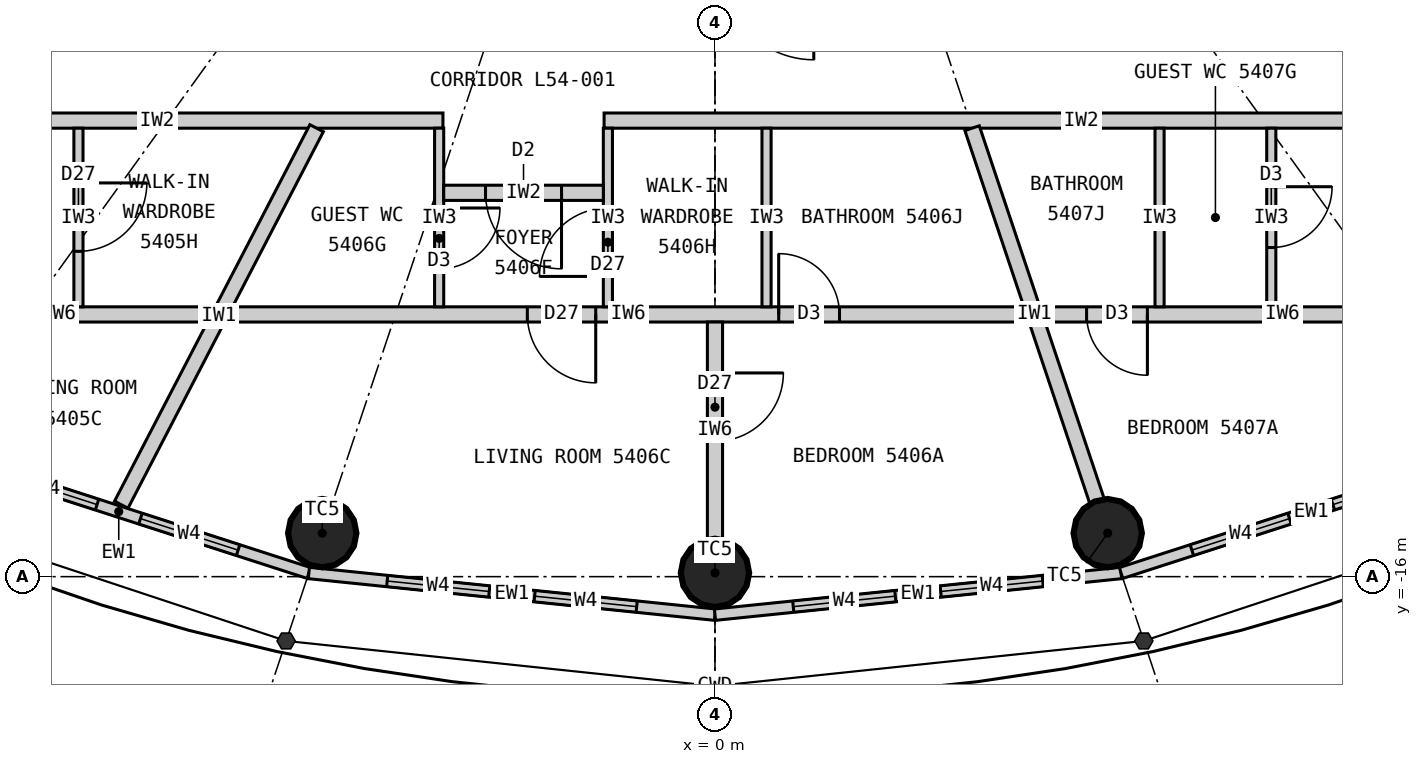
"""IFC4 building model, lengths in metres.
Left out: names, types, materials, properties, quantities, classifications, styles, units other than length and angle.
Written with IfcOpenShell. Run it as: python <this file> out.ifc"""

import sys

from ifc_helpers import new_model, si_unit, direction, frame, frame_2d, origin, origin_2d, place, context, subcontext, project, spatial, rectangle, circle, extrude, element, fill, save


model = new_model("IFC4")
c1 = context("Model", 3, precision=1e-05, world=origin(), true_north=direction((0.0, 1.0)))
c2 = subcontext(c1, "Body", "Model", "MODEL_VIEW")
j1 = project(units=[si_unit("LENGTHUNIT", "METRE"), si_unit("PLANEANGLEUNIT", "RADIAN")], contexts=[c1])
p1 = place(None, origin())
s1 = spatial("IfcSite", under=j1, at=p1, CompositionType="ELEMENT")
p2 = place(p1, origin())
s2 = spatial("IfcBuilding", under=s1, at=p2, CompositionType="ELEMENT")
p3 = place(p2, frame((0.0, 0.0, 202.8)))
s3 = spatial("IfcBuildingStorey", under=s2, at=p3, CompositionType="ELEMENT", Elevation=202.8)
for number, where, z_axis, x_axis in (
    (1, (-5.167, -15.427, 0.0), (0.0, 0.0, 1.0), (1.0, 0.0, 0.0)),
    (2, (0.0, -15.95, 0.0), (0.0, 0.0, 1.0), (1.0, 0.0, 0.0)),
    (3, (5.167, -15.427, 0.0), (0.0, 0.0, 1.0), (1.0, 0.0, 0.0)),
):
    element("IfcColumn", number, at=place(p3, frame(where, z_axis=z_axis, x_axis=x_axis)), inside=s3, PredefinedType="COLUMN", context=c2, shape_type="SweptSolid", body=[
        extrude(circle(Radius=0.45, at=origin_2d()), origin(), (0.0, 0.0, 1.0), 3.3),
    ])
p4 = place(p3, frame((-10.346, -14.336, 0.0), z_axis=(0.0, 0.0, 1.0), x_axis=(0.951644702515, -0.307200846638, 0.0)))
e4 = element("IfcWall", 4, at=p4, inside=s3, PredefinedType="ELEMENTEDWALL", context=c2, shape_type="SweptSolid", body=[
    extrude(rectangle(XDim=5.258, YDim=0.15, at=frame_2d((2.629, 0.0))), origin(), (0.0, 0.0, 1.0), 3.12),
])
p5 = place(p4, frame((0.979, 0.0, 0.9)))
e5 = element("IfcOpeningElement", 5, at=p5, cuts=e4, PredefinedType="OPENING", context=c2, shape_type="SweptSolid", body=[
    extrude(rectangle(XDim=1.35, YDim=1.9, at=frame_2d((0.675, 0.95))), frame((0.0, 0.085, 0.0), z_axis=(0.0, -1.0, 0.0), x_axis=(1.0, 0.0, 0.0)), (0.0, 0.0, 1.0), 0.17),
])
p6 = place(p4, frame((2.929, 0.0, 0.9)))
e6 = element("IfcOpeningElement", 6, at=p6, cuts=e4, PredefinedType="OPENING", context=c2, shape_type="SweptSolid", body=[
    extrude(rectangle(XDim=1.35, YDim=1.9, at=frame_2d((0.675, 0.95))), frame((0.0, 0.085, 0.0), z_axis=(0.0, -1.0, 0.0), x_axis=(1.0, 0.0, 0.0)), (0.0, 0.0, 1.0), 0.17),
])
p7 = place(p3, frame((-5.343, -15.952, 0.0), z_axis=(0.0, 0.0, 1.0), x_axis=(0.994774574972, -0.102095763818, 0.0)))
e7 = element("IfcWall", 7, at=p7, inside=s3, PredefinedType="ELEMENTEDWALL", context=c2, shape_type="SweptSolid", body=[
    extrude(rectangle(XDim=5.371, YDim=0.15, at=frame_2d((2.686, 0.0))), origin(), (0.0, 0.0, 1.0), 3.12),
])
p8 = place(p7, frame((1.035, 0.0, 0.9)))
e8 = element("IfcOpeningElement", 8, at=p8, cuts=e7, PredefinedType="OPENING", context=c2, shape_type="SweptSolid", body=[
    extrude(rectangle(XDim=1.35, YDim=1.9, at=frame_2d((0.675, 0.95))), frame((0.0, 0.085, 0.0), z_axis=(0.0, -1.0, 0.0), x_axis=(1.0, 0.0, 0.0)), (0.0, 0.0, 1.0), 0.17),
])
p9 = place(p7, frame((2.985, 0.0, 0.9)))
e9 = element("IfcOpeningElement", 9, at=p9, cuts=e7, PredefinedType="OPENING", context=c2, shape_type="SweptSolid", body=[
    extrude(rectangle(XDim=1.35, YDim=1.9, at=frame_2d((0.675, 0.95))), frame((0.0, 0.085, 0.0), z_axis=(0.0, -1.0, 0.0), x_axis=(1.0, 0.0, 0.0)), (0.0, 0.0, 1.0), 0.17),
])
p10 = place(p3, frame((0.0, -16.5, 0.0), z_axis=(0.0, 0.0, 1.0), x_axis=(0.994774574972, 0.102095763818, 0.0)))
e10 = element("IfcWall", 10, at=p10, inside=s3, PredefinedType="ELEMENTEDWALL", context=c2, shape_type="SweptSolid", body=[
    extrude(rectangle(XDim=5.371, YDim=0.15, at=frame_2d((2.686, 0.0))), origin(), (0.0, 0.0, 1.0), 3.12),
])
p11 = place(p10, frame((1.035, 0.0, 0.9)))
e11 = element("IfcOpeningElement", 11, at=p11, cuts=e10, PredefinedType="OPENING", context=c2, shape_type="SweptSolid", body=[
    extrude(rectangle(XDim=1.35, YDim=1.9, at=frame_2d((0.675, 0.95))), frame((0.0, 0.085, 0.0), z_axis=(0.0, -1.0, 0.0), x_axis=(1.0, 0.0, 0.0)), (0.0, 0.0, 1.0), 0.17),
])
p12 = place(p10, frame((2.985, 0.0, 0.9)))
e12 = element("IfcOpeningElement", 12, at=p12, cuts=e10, PredefinedType="OPENING", context=c2, shape_type="SweptSolid", body=[
    extrude(rectangle(XDim=1.35, YDim=1.9, at=frame_2d((0.675, 0.95))), frame((0.0, 0.085, 0.0), z_axis=(0.0, -1.0, 0.0), x_axis=(1.0, 0.0, 0.0)), (0.0, 0.0, 1.0), 0.17),
])
p13 = place(p3, frame((5.343, -15.952, 0.0), z_axis=(0.0, 0.0, 1.0), x_axis=(0.951644702515, 0.307200846638, 0.0)))
e13 = element("IfcWall", 13, at=p13, inside=s3, PredefinedType="ELEMENTEDWALL", context=c2, shape_type="SweptSolid", body=[
    extrude(rectangle(XDim=5.258, YDim=0.15, at=frame_2d((2.629, 0.0))), origin(), (0.0, 0.0, 1.0), 3.12),
])
p14 = place(p13, frame((0.979, 0.0, 0.9)))
e14 = element("IfcOpeningElement", 14, at=p14, cuts=e13, PredefinedType="OPENING", context=c2, shape_type="SweptSolid", body=[
    extrude(rectangle(XDim=1.35, YDim=1.9, at=frame_2d((0.675, 0.95))), frame((0.0, 0.085, 0.0), z_axis=(0.0, -1.0, 0.0), x_axis=(1.0, 0.0, 0.0)), (0.0, 0.0, 1.0), 0.17),
])
p15 = place(p13, frame((2.929, 0.0, 0.9)))
e15 = element("IfcOpeningElement", 15, at=p15, cuts=e13, PredefinedType="OPENING", context=c2, shape_type="SweptSolid", body=[
    extrude(rectangle(XDim=1.35, YDim=1.9, at=frame_2d((0.675, 0.95))), frame((0.0, 0.085, 0.0), z_axis=(0.0, -1.0, 0.0), x_axis=(1.0, 0.0, 0.0)), (0.0, 0.0, 1.0), 0.17),
])
p16 = place(p3, frame((11.1, -10.0, 0.0), z_axis=(0.0, 0.0, 1.0), x_axis=(-1.0, 0.0, 0.0)))
e16 = element("IfcWall", 16, at=p16, inside=s3, PredefinedType="PARTITIONING", context=c2, shape_type="SweptSolid", body=[
    extrude(rectangle(XDim=12.559, YDim=0.2, at=frame_2d((6.28, 0.0))), origin(), (0.0, 0.0, 1.0), 3.12),
])
p17 = place(p3, frame((-3.579, -10.0, 0.0), z_axis=(0.0, 0.0, 1.0), x_axis=(-1.0, 0.0, 0.0)))
e17 = element("IfcWall", 17, at=p17, inside=s3, PredefinedType="PARTITIONING", context=c2, shape_type="SweptSolid", body=[
    extrude(rectangle(XDim=7.521, YDim=0.2, at=frame_2d((3.761, 0.0))), origin(), (0.0, 0.0, 1.0), 3.12),
])
p18 = place(p17, frame((6.206, 0.0, 0.0)))
e18 = element("IfcOpeningElement", 18, at=p18, cuts=e17, PredefinedType="OPENING", context=c2, shape_type="SweptSolid", body=[
    extrude(rectangle(XDim=1.0, YDim=2.2, at=frame_2d((0.5, 1.1))), frame((0.0, 0.11, 0.0), z_axis=(0.0, -1.0, 0.0), x_axis=(1.0, 0.0, 0.0)), (0.0, 0.0, 1.0), 0.22),
])
p19 = place(p3, frame((-5.241, -10.1, 0.0), z_axis=(0.0, 0.0, 1.0), x_axis=(-0.460603196597, -0.887606160008, 0.0)))
e19 = element("IfcWall", 19, at=p19, inside=s3, PredefinedType="PARTITIONING", context=c2, shape_type="SweptSolid", body=[
    extrude(rectangle(XDim=5.58, YDim=0.2, at=frame_2d((2.79, 0.0))), origin(), (0.0, 0.0, 1.0), 3.12),
])
p20 = place(p3, frame((3.383, -10.1, 0.0), z_axis=(0.0, 0.0, 1.0), x_axis=(0.317602151035, -0.948224063003, 0.0)))
e20 = element("IfcWall", 20, at=p20, inside=s3, PredefinedType="PARTITIONING", context=c2, shape_type="SweptSolid", body=[
    extrude(rectangle(XDim=5.168, YDim=0.2, at=frame_2d((2.584, 0.0))), origin(), (0.0, 0.0, 1.0), 2.42),
])
p21 = place(p3, frame((-10.609, -12.55, 0.0), z_axis=(0.0, 0.0, 1.0), x_axis=(1.0, 0.0, 0.0)))
e21 = element("IfcWall", 21, at=p21, inside=s3, PredefinedType="PARTITIONING", context=c2, shape_type="SweptSolid", body=[
    extrude(rectangle(XDim=3.947, YDim=0.2, at=frame_2d((1.974, 0.0))), origin(), (0.0, 0.0, 1.0), 3.12),
])
p22 = place(p3, frame((-8.375, -10.1, 0.0), z_axis=(0.0, 0.0, 1.0), x_axis=(0.0, -1.0, 0.0)))
e22 = element("IfcWall", 22, at=p22, inside=s3, PredefinedType="PARTITIONING", context=c2, shape_type="SweptSolid", body=[
    extrude(rectangle(XDim=2.35, YDim=0.12, at=frame_2d((1.175, 0.0))), origin(), (0.0, 0.0, 1.0), 3.12),
])
p23 = place(p22, frame((0.72, 0.0, 0.0)))
e23 = element("IfcOpeningElement", 23, at=p23, cuts=e22, PredefinedType="OPENING", context=c2, shape_type="SweptSolid", body=[
    extrude(rectangle(XDim=0.9, YDim=2.1, at=frame_2d((0.45, 1.05))), frame((0.0, 0.07, 0.0), z_axis=(0.0, -1.0, 0.0), x_axis=(1.0, 0.0, 0.0)), (0.0, 0.0, 1.0), 0.14),
])
p24 = place(p3, frame((-6.364, -12.55, 0.0), z_axis=(0.0, 0.0, 1.0), x_axis=(1.0, 0.0, 0.0)))
e24 = element("IfcWall", 24, at=p24, inside=s3, PredefinedType="PARTITIONING", context=c2, shape_type="SweptSolid", body=[
    extrude(rectangle(XDim=10.446, YDim=0.2, at=frame_2d((5.223, 0.0))), origin(), (0.0, 0.0, 1.0), 3.12),
])
p25 = place(p24, frame((7.202, 0.0, 0.0)))
e25 = element("IfcOpeningElement", 25, at=p25, cuts=e24, PredefinedType="OPENING", context=c2, shape_type="SweptSolid", body=[
    extrude(rectangle(XDim=0.8, YDim=2.1, at=frame_2d((0.4, 1.05))), frame((0.0, 0.11, 0.0), z_axis=(0.0, -1.0, 0.0), x_axis=(1.0, 0.0, 0.0)), (0.0, 0.0, 1.0), 0.22),
])
p26 = place(p24, frame((3.895, 0.0, 0.0)))
e26 = element("IfcOpeningElement", 26, at=p26, cuts=e24, PredefinedType="OPENING", context=c2, shape_type="SweptSolid", body=[
    extrude(rectangle(XDim=0.9, YDim=2.1, at=frame_2d((0.45, 1.05))), frame((0.0, 0.11, 0.0), z_axis=(0.0, -1.0, 0.0), x_axis=(1.0, 0.0, 0.0)), (0.0, 0.0, 1.0), 0.22),
])
p27 = place(p3, frame((0.0, -12.65, 0.0), z_axis=(0.0, 0.0, 1.0), x_axis=(0.0, -1.0, 0.0)))
e27 = element("IfcWall", 27, at=p27, inside=s3, PredefinedType="PARTITIONING", context=c2, shape_type="SweptSolid", body=[
    extrude(rectangle(XDim=2.85, YDim=0.2, at=frame_2d((1.425, 0.0))), origin(), (0.0, 0.0, 1.0), 2.42),
])
p28 = place(p27, frame((0.67, 0.0, 0.0)))
e28 = element("IfcOpeningElement", 28, at=p28, cuts=e27, PredefinedType="OPENING", context=c2, shape_type="SweptSolid", body=[
    extrude(rectangle(XDim=0.9, YDim=2.1, at=frame_2d((0.45, 1.05))), frame((0.0, 0.11, 0.0), z_axis=(0.0, -1.0, 0.0), x_axis=(1.0, 0.0, 0.0)), (0.0, 0.0, 1.0), 0.22),
])
p29 = place(p3, frame((-3.629, -10.1, 0.0), z_axis=(0.0, 0.0, 1.0), x_axis=(0.0, -1.0, 0.0)))
e29 = element("IfcWall", 29, at=p29, inside=s3, PredefinedType="PARTITIONING", context=c2, shape_type="SweptSolid", body=[
    extrude(rectangle(XDim=2.35, YDim=0.12, at=frame_2d((1.175, 0.0))), origin(), (0.0, 0.0, 1.0), 3.12),
])
p30 = place(p29, frame((1.05, 0.0, 0.0)))
e30 = element("IfcOpeningElement", 30, at=p30, cuts=e29, PredefinedType="OPENING", context=c2, shape_type="SweptSolid", body=[
    extrude(rectangle(XDim=0.8, YDim=2.1, at=frame_2d((0.4, 1.05))), frame((0.0, 0.07, 0.0), z_axis=(0.0, -1.0, 0.0), x_axis=(1.0, 0.0, 0.0)), (0.0, 0.0, 1.0), 0.14),
])
p31 = place(p3, frame((-1.409, -10.1, 0.0), z_axis=(0.0, 0.0, 1.0), x_axis=(0.0, -1.0, 0.0)))
e31 = element("IfcWall", 31, at=p31, inside=s3, PredefinedType="PARTITIONING", context=c2, shape_type="SweptSolid", body=[
    extrude(rectangle(XDim=2.35, YDim=0.12, at=frame_2d((1.175, 0.0))), origin(), (0.0, 0.0, 1.0), 3.12),
])
p32 = place(p31, frame((1.05, 0.0, 0.0)))
e32 = element("IfcOpeningElement", 32, at=p32, cuts=e31, PredefinedType="OPENING", context=c2, shape_type="SweptSolid", body=[
    extrude(rectangle(XDim=0.9, YDim=2.1, at=frame_2d((0.45, 1.05))), frame((0.0, 0.07, 0.0), z_axis=(0.0, -1.0, 0.0), x_axis=(1.0, 0.0, 0.0)), (0.0, 0.0, 1.0), 0.14),
])
p33 = place(p3, frame((0.678, -10.1, 0.0), z_axis=(0.0, 0.0, 1.0), x_axis=(0.0, -1.0, 0.0)))
e33 = element("IfcWall", 33, at=p33, inside=s3, PredefinedType="PARTITIONING", context=c2, shape_type="SweptSolid", body=[
    extrude(rectangle(XDim=2.35, YDim=0.12, at=frame_2d((1.175, 0.0))), origin(), (0.0, 0.0, 1.0), 3.12),
])
p34 = place(p3, frame((-3.569, -10.95, 0.0), z_axis=(0.0, 0.0, 1.0), x_axis=(1.0, 0.0, 0.0)))
e34 = element("IfcWall", 34, at=p34, inside=s3, PredefinedType="PARTITIONING", context=c2, shape_type="SweptSolid", body=[
    extrude(rectangle(XDim=2.1, YDim=0.2, at=frame_2d((1.05, 0.0))), origin(), (0.0, 0.0, 1.0), 3.12),
])
p35 = place(p34, frame((0.55, 0.0, 0.0)))
e35 = element("IfcOpeningElement", 35, at=p35, cuts=e34, PredefinedType="OPENING", context=c2, shape_type="SweptSolid", body=[
    extrude(rectangle(XDim=1.0, YDim=2.2, at=frame_2d((0.5, 1.1))), frame((0.0, 0.11, 0.0), z_axis=(0.0, -1.0, 0.0), x_axis=(1.0, 0.0, 0.0)), (0.0, 0.0, 1.0), 0.22),
])
p36 = place(p3, frame((4.325, -12.55, 0.0), z_axis=(0.0, 0.0, 1.0), x_axis=(1.0, 0.0, 0.0)))
e36 = element("IfcWall", 36, at=p36, inside=s3, PredefinedType="PARTITIONING", context=c2, shape_type="SweptSolid", body=[
    extrude(rectangle(XDim=6.284, YDim=0.2, at=frame_2d((3.142, 0.0))), origin(), (0.0, 0.0, 1.0), 3.12),
])
p37 = place(p36, frame((0.564, 0.0, 0.0)))
e37 = element("IfcOpeningElement", 37, at=p37, cuts=e36, PredefinedType="OPENING", context=c2, shape_type="SweptSolid", body=[
    extrude(rectangle(XDim=0.8, YDim=2.1, at=frame_2d((0.4, 1.05))), frame((0.0, 0.11, 0.0), z_axis=(0.0, -1.0, 0.0), x_axis=(1.0, 0.0, 0.0)), (0.0, 0.0, 1.0), 0.22),
])
p38 = place(p3, frame((5.849, -10.1, 0.0), z_axis=(0.0, 0.0, 1.0), x_axis=(0.0, -1.0, 0.0)))
e38 = element("IfcWall", 38, at=p38, inside=s3, PredefinedType="PARTITIONING", context=c2, shape_type="SweptSolid", body=[
    extrude(rectangle(XDim=2.35, YDim=0.12, at=frame_2d((1.175, 0.0))), origin(), (0.0, 0.0, 1.0), 3.12),
])
p39 = place(p3, frame((7.319, -10.1, 0.0), z_axis=(0.0, 0.0, 1.0), x_axis=(0.0, -1.0, 0.0)))
e39 = element("IfcWall", 39, at=p39, inside=s3, PredefinedType="PARTITIONING", context=c2, shape_type="SweptSolid", body=[
    extrude(rectangle(XDim=2.35, YDim=0.12, at=frame_2d((1.175, 0.0))), origin(), (0.0, 0.0, 1.0), 3.12),
])
p40 = place(p39, frame((0.77, 0.0, 0.0)))
e40 = element("IfcOpeningElement", 40, at=p40, cuts=e39, PredefinedType="OPENING", context=c2, shape_type="SweptSolid", body=[
    extrude(rectangle(XDim=0.8, YDim=2.1, at=frame_2d((0.4, 1.05))), frame((0.0, 0.07, 0.0), z_axis=(0.0, -1.0, 0.0), x_axis=(1.0, 0.0, 0.0)), (0.0, 0.0, 1.0), 0.14),
])
p41 = place(p5, origin())
e41 = element("IfcWindow", 41, at=p41, inside=s3, PartitioningType="SINGLE_PANEL", PredefinedType="WINDOW", context=c2, shape_type="SweptSolid", body=[
    extrude(rectangle(XDim=1.35, YDim=1.9, at=frame_2d((0.675, 0.95))), frame((0.0, 0.03, 0.0), z_axis=(0.0, -1.0, 0.0), x_axis=(1.0, 0.0, 0.0)), (0.0, 0.0, 1.0), 0.06),
])
fill(e5, e41)
p42 = place(p6, origin())
e42 = element("IfcWindow", 42, at=p42, inside=s3, PartitioningType="SINGLE_PANEL", PredefinedType="WINDOW", context=c2, shape_type="SweptSolid", body=[
    extrude(rectangle(XDim=1.35, YDim=1.9, at=frame_2d((0.675, 0.95))), frame((0.0, 0.03, 0.0), z_axis=(0.0, -1.0, 0.0), x_axis=(1.0, 0.0, 0.0)), (0.0, 0.0, 1.0), 0.06),
])
fill(e6, e42)
p43 = place(p8, origin())
e43 = element("IfcWindow", 43, at=p43, inside=s3, PartitioningType="SINGLE_PANEL", PredefinedType="WINDOW", context=c2, shape_type="SweptSolid", body=[
    extrude(rectangle(XDim=1.35, YDim=1.9, at=frame_2d((0.675, 0.95))), frame((0.0, 0.03, 0.0), z_axis=(0.0, -1.0, 0.0), x_axis=(1.0, 0.0, 0.0)), (0.0, 0.0, 1.0), 0.06),
])
fill(e8, e43)
p44 = place(p9, origin())
e44 = element("IfcWindow", 44, at=p44, inside=s3, PartitioningType="SINGLE_PANEL", PredefinedType="WINDOW", context=c2, shape_type="SweptSolid", body=[
    extrude(rectangle(XDim=1.35, YDim=1.9, at=frame_2d((0.675, 0.95))), frame((0.0, 0.03, 0.0), z_axis=(0.0, -1.0, 0.0), x_axis=(1.0, 0.0, 0.0)), (0.0, 0.0, 1.0), 0.06),
])
fill(e9, e44)
p45 = place(p11, origin())
e45 = element("IfcWindow", 45, at=p45, inside=s3, PartitioningType="SINGLE_PANEL", PredefinedType="WINDOW", context=c2, shape_type="SweptSolid", body=[
    extrude(rectangle(XDim=1.35, YDim=1.9, at=frame_2d((0.675, 0.95))), frame((0.0, 0.03, 0.0), z_axis=(0.0, -1.0, 0.0), x_axis=(1.0, 0.0, 0.0)), (0.0, 0.0, 1.0), 0.06),
])
fill(e11, e45)
p46 = place(p12, origin())
e46 = element("IfcWindow", 46, at=p46, inside=s3, PartitioningType="SINGLE_PANEL", PredefinedType="WINDOW", context=c2, shape_type="SweptSolid", body=[
    extrude(rectangle(XDim=1.35, YDim=1.9, at=frame_2d((0.675, 0.95))), frame((0.0, 0.03, 0.0), z_axis=(0.0, -1.0, 0.0), x_axis=(1.0, 0.0, 0.0)), (0.0, 0.0, 1.0), 0.06),
])
fill(e12, e46)
p47 = place(p14, origin())
e47 = element("IfcWindow", 47, at=p47, inside=s3, PartitioningType="SINGLE_PANEL", PredefinedType="WINDOW", context=c2, shape_type="SweptSolid", body=[
    extrude(rectangle(XDim=1.35, YDim=1.9, at=frame_2d((0.675, 0.95))), frame((0.0, 0.03, 0.0), z_axis=(0.0, -1.0, 0.0), x_axis=(1.0, 0.0, 0.0)), (0.0, 0.0, 1.0), 0.06),
])
fill(e14, e47)
p48 = place(p15, origin())
e48 = element("IfcWindow", 48, at=p48, inside=s3, PartitioningType="SINGLE_PANEL", PredefinedType="WINDOW", context=c2, shape_type="SweptSolid", body=[
    extrude(rectangle(XDim=1.35, YDim=1.9, at=frame_2d((0.675, 0.95))), frame((0.0, 0.03, 0.0), z_axis=(0.0, -1.0, 0.0), x_axis=(1.0, 0.0, 0.0)), (0.0, 0.0, 1.0), 0.06),
])
fill(e15, e48)
p49 = place(p23, origin())
e49 = element("IfcDoor", 49, at=p49, inside=s3, OperationType="SINGLE_SWING_LEFT", PredefinedType="DOOR", context=c2, shape_type="SweptSolid", body=[
    extrude(rectangle(XDim=0.9, YDim=2.1, at=frame_2d((0.45, 1.05))), frame((0.0, 0.025, 0.0), z_axis=(0.0, -1.0, 0.0), x_axis=(1.0, 0.0, 0.0)), (0.0, 0.0, 1.0), 0.05),
])
fill(e23, e49)
p50 = place(p35, origin())
e50 = element("IfcDoor", 50, at=p50, inside=s3, OperationType="SINGLE_SWING_RIGHT", PredefinedType="DOOR", context=c2, shape_type="SweptSolid", body=[
    extrude(rectangle(XDim=1.0, YDim=2.2, at=frame_2d((0.5, 1.1))), frame((0.0, 0.025, 0.0), z_axis=(0.0, -1.0, 0.0), x_axis=(1.0, 0.0, 0.0)), (0.0, 0.0, 1.0), 0.05),
])
fill(e35, e50)
p51 = place(p30, origin())
e51 = element("IfcDoor", 51, at=p51, inside=s3, OperationType="SINGLE_SWING_LEFT", PredefinedType="DOOR", context=c2, shape_type="SweptSolid", body=[
    extrude(rectangle(XDim=0.8, YDim=2.1, at=frame_2d((0.4, 1.05))), frame((0.0, 0.025, 0.0), z_axis=(0.0, -1.0, 0.0), x_axis=(1.0, 0.0, 0.0)), (0.0, 0.0, 1.0), 0.05),
])
fill(e30, e51)
p52 = place(p32, origin())
e52 = element("IfcDoor", 52, at=p52, inside=s3, OperationType="SINGLE_SWING_RIGHT", PredefinedType="DOOR", context=c2, shape_type="SweptSolid", body=[
    extrude(rectangle(XDim=0.9, YDim=2.1, at=frame_2d((0.45, 1.05))), frame((0.0, 0.025, 0.0), z_axis=(0.0, -1.0, 0.0), x_axis=(1.0, 0.0, 0.0)), (0.0, 0.0, 1.0), 0.05),
])
fill(e32, e52)
p53 = place(p25, origin())
e53 = element("IfcDoor", 53, at=p53, inside=s3, OperationType="SINGLE_SWING_LEFT", PredefinedType="DOOR", context=c2, shape_type="SweptSolid", body=[
    extrude(rectangle(XDim=0.8, YDim=2.1, at=frame_2d((0.4, 1.05))), frame((0.0, 0.025, 0.0), z_axis=(0.0, -1.0, 0.0), x_axis=(1.0, 0.0, 0.0)), (0.0, 0.0, 1.0), 0.05),
])
fill(e25, e53)
p54 = place(p26, origin())
e54 = element("IfcDoor", 54, at=p54, inside=s3, OperationType="SINGLE_SWING_RIGHT", PredefinedType="DOOR", context=c2, shape_type="SweptSolid", body=[
    extrude(rectangle(XDim=0.9, YDim=2.1, at=frame_2d((0.45, 1.05))), frame((0.0, 0.025, 0.0), z_axis=(0.0, -1.0, 0.0), x_axis=(1.0, 0.0, 0.0)), (0.0, 0.0, 1.0), 0.05),
])
fill(e26, e54)
p55 = place(p28, origin())
e55 = element("IfcDoor", 55, at=p55, inside=s3, OperationType="SINGLE_SWING_LEFT", PredefinedType="DOOR", context=c2, shape_type="SweptSolid", body=[
    extrude(rectangle(XDim=0.9, YDim=2.1, at=frame_2d((0.45, 1.05))), frame((0.0, 0.025, 0.0), z_axis=(0.0, -1.0, 0.0), x_axis=(1.0, 0.0, 0.0)), (0.0, 0.0, 1.0), 0.05),
])
fill(e28, e55)
p56 = place(p37, origin())
e56 = element("IfcDoor", 56, at=p56, inside=s3, OperationType="SINGLE_SWING_RIGHT", PredefinedType="DOOR", context=c2, shape_type="SweptSolid", body=[
    extrude(rectangle(XDim=0.8, YDim=2.1, at=frame_2d((0.4, 1.05))), frame((0.0, 0.025, 0.0), z_axis=(0.0, -1.0, 0.0), x_axis=(1.0, 0.0, 0.0)), (0.0, 0.0, 1.0), 0.05),
])
fill(e37, e56)
p57 = place(p40, origin())
e57 = element("IfcDoor", 57, at=p57, inside=s3, OperationType="SINGLE_SWING_LEFT", PredefinedType="DOOR", context=c2, shape_type="SweptSolid", body=[
    extrude(rectangle(XDim=0.8, YDim=2.1, at=frame_2d((0.4, 1.05))), frame((0.0, 0.025, 0.0), z_axis=(0.0, -1.0, 0.0), x_axis=(1.0, 0.0, 0.0)), (0.0, 0.0, 1.0), 0.05),
])
fill(e40, e57)
save(model, sys.argv[1])
